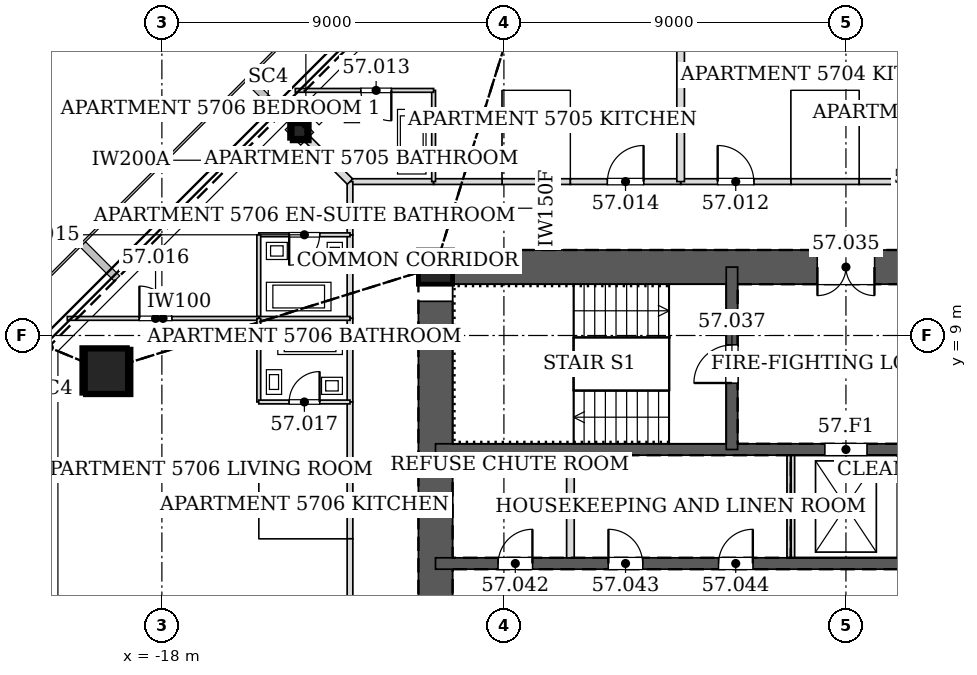
"""IFC4 building model, lengths in metres.
Left out: names, types, materials, properties, quantities, classifications, styles, units other than length and angle.
Written with IfcOpenShell. Run it as: python <this file> out.ifc"""

import sys

from ifc_helpers import new_model, si_unit, direction, frame, frame_2d, origin, origin_2d, place, context, subcontext, project, spatial, rectangle, hollow_rectangle, extrude, element, fill, save


model = new_model("IFC4")
c1 = context("Model", 3, precision=1e-05, world=origin(), true_north=direction((0.0, 1.0)))
c2 = subcontext(c1, "Body", "Model", "MODEL_VIEW")
j1 = project(units=[si_unit("LENGTHUNIT", "METRE"), si_unit("PLANEANGLEUNIT", "RADIAN")], contexts=[c1])
p1 = place(None, origin())
s1 = spatial("IfcSite", under=j1, at=p1, CompositionType="ELEMENT")
p2 = place(p1, origin())
s2 = spatial("IfcBuilding", under=s1, at=p2, CompositionType="ELEMENT")
p3 = place(p2, frame((0.0, 0.0, 241.4)))
s3 = spatial("IfcBuildingStorey", under=s2, at=p3, CompositionType="ELEMENT", Elevation=241.4)
p4 = place(p3, frame((-19.508, 8.08, 0.0), z_axis=(0.028277121884, -0.011698403216, 0.999531666202), x_axis=(0.382282742426, 0.924045401938, 0.0)))
e1 = element("IfcColumn", 1, at=p4, inside=s3, PredefinedType="COLUMN", context=c2, shape_type="SweptSolid", body=[
    extrude(hollow_rectangle(XDim=1.2, YDim=1.2, WallThickness=0.055, at=origin_2d()), origin(), (0.0, 0.0, 1.0), 3.402),
])
p5 = place(p3, frame((-14.415, 14.415, 0.0), z_axis=(0.020024994503, -0.020024994503, 0.999598919162), x_axis=(0.707106781187, 0.707106781187, 0.0)))
e2 = element("IfcColumn", 2, at=p5, inside=s3, PredefinedType="COLUMN", context=c2, shape_type="SweptSolid", body=[
    extrude(hollow_rectangle(XDim=0.45, YDim=0.45, WallThickness=0.02, at=origin_2d()), origin(), (0.0, 0.0, 1.0), 3.402),
])
p6 = place(p3, frame((-10.8, 10.8, 0.0), z_axis=(0.0, 0.0, 1.0), x_axis=(1.0, 0.0, 0.0)))
e3 = element("IfcColumn", 3, at=p6, inside=s3, PredefinedType="COLUMN", context=c2, shape_type="SweptSolid", body=[
    extrude(hollow_rectangle(XDim=0.9, YDim=0.9, WallThickness=0.04, at=origin_2d()), origin(), (0.0, 0.0, 1.0), 3.4),
])
p7 = place(p3, frame((10.8, 10.8, 0.0), z_axis=(0.0, 0.0, 1.0), x_axis=(-1.0, 0.0, 0.0)))
e4 = element("IfcWall", 4, at=p7, inside=s3, PredefinedType="SOLIDWALL", context=c2, shape_type="SweptSolid", body=[
    extrude(rectangle(XDim=21.6, YDim=0.9, at=frame_2d((10.8, 0.0))), origin(), (0.0, 0.0, 1.0), 3.4),
])
p8 = place(p7, frame((10.05, 0.0, 0.0)))
e5 = element("IfcOpeningElement", 5, at=p8, cuts=e4, PredefinedType="OPENING", context=c2, shape_type="SweptSolid", body=[
    extrude(rectangle(XDim=1.5, YDim=2.1, at=frame_2d((0.75, 1.05))), frame((0.0, 0.46, 0.0), z_axis=(0.0, -1.0, 0.0), x_axis=(1.0, 0.0, 0.0)), (0.0, 0.0, 1.0), 0.92),
])
p9 = place(p3, frame((-10.8, 10.8, 0.0), z_axis=(0.0, 0.0, 1.0), x_axis=(0.0, -1.0, 0.0)))
e6 = element("IfcWall", 6, at=p9, inside=s3, PredefinedType="SOLIDWALL", context=c2, shape_type="SweptSolid", body=[
    extrude(rectangle(XDim=21.6, YDim=0.9, at=frame_2d((10.8, 0.0))), origin(), (0.0, 0.0, 1.0), 3.4),
])
p10 = place(p9, frame((8.7, 0.0, 0.0)))
e7 = element("IfcOpeningElement", 7, at=p10, cuts=e6, PredefinedType="OPENING", context=c2, shape_type="SweptSolid", body=[
    extrude(rectangle(XDim=1.2, YDim=2.1, at=frame_2d((0.6, 1.05))), frame((0.0, 0.46, 0.0), z_axis=(0.0, -1.0, 0.0), x_axis=(1.0, 0.0, 0.0)), (0.0, 0.0, 1.0), 0.92),
])
p11 = place(p9, frame((11.7, 0.0, 0.0)))
e8 = element("IfcOpeningElement", 8, at=p11, cuts=e6, PredefinedType="OPENING", context=c2, shape_type="SweptSolid", body=[
    extrude(rectangle(XDim=1.2, YDim=2.1, at=frame_2d((0.6, 1.05))), frame((0.0, 0.46, 0.0), z_axis=(0.0, -1.0, 0.0), x_axis=(1.0, 0.0, 0.0)), (0.0, 0.0, 1.0), 0.92),
])
p12 = place(p3, frame((-10.8, 3.0, 0.0), z_axis=(0.0, 0.0, 1.0), x_axis=(1.0, 0.0, 0.0)))
e9 = element("IfcWall", 9, at=p12, inside=s3, PredefinedType="SOLIDWALL", context=c2, shape_type="SweptSolid", body=[
    extrude(rectangle(XDim=21.6, YDim=0.3, at=frame_2d((10.8, 0.0))), origin(), (0.0, 0.0, 1.0), 3.4),
])
p13 = place(p12, frame((1.65, 0.0, 0.0)))
e10 = element("IfcOpeningElement", 10, at=p13, cuts=e9, PredefinedType="OPENING", context=c2, shape_type="SweptSolid", body=[
    extrude(rectangle(XDim=0.9, YDim=2.1, at=frame_2d((0.45, 1.05))), frame((0.0, 0.16, 0.0), z_axis=(0.0, -1.0, 0.0), x_axis=(1.0, 0.0, 0.0)), (0.0, 0.0, 1.0), 0.32),
])
p14 = place(p12, frame((4.55, 0.0, 0.0)))
e11 = element("IfcOpeningElement", 11, at=p14, cuts=e9, PredefinedType="OPENING", context=c2, shape_type="SweptSolid", body=[
    extrude(rectangle(XDim=0.9, YDim=2.1, at=frame_2d((0.45, 1.05))), frame((0.0, 0.16, 0.0), z_axis=(0.0, -1.0, 0.0), x_axis=(1.0, 0.0, 0.0)), (0.0, 0.0, 1.0), 0.32),
])
p15 = place(p12, frame((7.45, 0.0, 0.0)))
e12 = element("IfcOpeningElement", 12, at=p15, cuts=e9, PredefinedType="OPENING", context=c2, shape_type="SweptSolid", body=[
    extrude(rectangle(XDim=0.9, YDim=2.1, at=frame_2d((0.45, 1.05))), frame((0.0, 0.16, 0.0), z_axis=(0.0, -1.0, 0.0), x_axis=(1.0, 0.0, 0.0)), (0.0, 0.0, 1.0), 0.32),
])
p16 = place(p12, frame((13.25, 0.0, 0.0)))
e13 = element("IfcOpeningElement", 13, at=p16, cuts=e9, PredefinedType="OPENING", context=c2, shape_type="SweptSolid", body=[
    extrude(rectangle(XDim=0.9, YDim=2.1, at=frame_2d((0.45, 1.05))), frame((0.0, 0.16, 0.0), z_axis=(0.0, -1.0, 0.0), x_axis=(1.0, 0.0, 0.0)), (0.0, 0.0, 1.0), 0.32),
])
p17 = place(p12, frame((16.15, 0.0, 0.0)))
e14 = element("IfcOpeningElement", 14, at=p17, cuts=e9, PredefinedType="OPENING", context=c2, shape_type="SweptSolid", body=[
    extrude(rectangle(XDim=0.9, YDim=2.1, at=frame_2d((0.45, 1.05))), frame((0.0, 0.16, 0.0), z_axis=(0.0, -1.0, 0.0), x_axis=(1.0, 0.0, 0.0)), (0.0, 0.0, 1.0), 0.32),
])
p18 = place(p12, frame((19.05, 0.0, 0.0)))
e15 = element("IfcOpeningElement", 15, at=p18, cuts=e9, PredefinedType="OPENING", context=c2, shape_type="SweptSolid", body=[
    extrude(rectangle(XDim=0.9, YDim=2.1, at=frame_2d((0.45, 1.05))), frame((0.0, 0.16, 0.0), z_axis=(0.0, -1.0, 0.0), x_axis=(1.0, 0.0, 0.0)), (0.0, 0.0, 1.0), 0.32),
])
p19 = place(p3, frame((-10.8, 6.0, 0.0), z_axis=(0.0, 0.0, 1.0), x_axis=(1.0, 0.0, 0.0)))
e16 = element("IfcWall", 16, at=p19, inside=s3, PredefinedType="SOLIDWALL", context=c2, shape_type="SweptSolid", body=[
    extrude(rectangle(XDim=21.6, YDim=0.3, at=frame_2d((10.8, 0.0))), origin(), (0.0, 0.0, 1.0), 3.4),
])
p20 = place(p19, frame((10.25, 0.0, 0.0)))
e17 = element("IfcOpeningElement", 17, at=p20, cuts=e16, PredefinedType="OPENING", context=c2, shape_type="SweptSolid", body=[
    extrude(rectangle(XDim=1.1, YDim=2.1, at=frame_2d((0.55, 1.05))), frame((0.0, 0.16, 0.0), z_axis=(0.0, -1.0, 0.0), x_axis=(1.0, 0.0, 0.0)), (0.0, 0.0, 1.0), 0.32),
])
p21 = place(p3, frame((-3.0, 6.0, 0.0), z_axis=(0.0, 0.0, 1.0), x_axis=(0.0, 1.0, 0.0)))
e18 = element("IfcWall", 18, at=p21, inside=s3, PredefinedType="SOLIDWALL", context=c2, shape_type="SweptSolid", body=[
    extrude(rectangle(XDim=4.8, YDim=0.3, at=frame_2d((2.4, 0.0))), origin(), (0.0, 0.0, 1.0), 3.4),
])
p22 = place(p21, frame((1.75, 0.0, 0.0)))
e19 = element("IfcOpeningElement", 19, at=p22, cuts=e18, PredefinedType="OPENING", context=c2, shape_type="SweptSolid", body=[
    extrude(rectangle(XDim=1.0, YDim=2.1, at=frame_2d((0.5, 1.05))), frame((0.0, 0.16, 0.0), z_axis=(0.0, -1.0, 0.0), x_axis=(1.0, 0.0, 0.0)), (0.0, 0.0, 1.0), 0.32),
])
p23 = place(p3, frame((0.351, 13.05, 0.0), z_axis=(0.0, 0.0, 1.0), x_axis=(-1.0, 0.0, 0.0)))
e20 = element("IfcWall", 20, at=p23, inside=s3, PredefinedType="PARTITIONING", context=c2, shape_type="SweptSolid", body=[
    extrude(rectangle(XDim=1.802, YDim=0.15, at=frame_2d((0.901, 0.0))), origin(), (0.0, 0.0, 1.0), 2.332),
])
p24 = place(p3, frame((-1.449, 13.05, 0.0), z_axis=(0.0, 0.0, 1.0), x_axis=(-1.0, 0.0, 0.0)))
e21 = element("IfcWall", 21, at=p24, inside=s3, PredefinedType="PARTITIONING", context=c2, shape_type="SweptSolid", body=[
    extrude(rectangle(XDim=2.902, YDim=0.15, at=frame_2d((1.451, 0.0))), origin(), (0.0, 0.0, 1.0), 2.662),
])
p25 = place(p24, frame((0.976, 0.0, 0.0)))
e22 = element("IfcOpeningElement", 22, at=p25, cuts=e21, PredefinedType="OPENING", context=c2, shape_type="SweptSolid", body=[
    extrude(rectangle(XDim=0.95, YDim=2.1, at=frame_2d((0.475, 1.05))), frame((0.0, 0.085, 0.0), z_axis=(0.0, -1.0, 0.0), x_axis=(1.0, 0.0, 0.0)), (0.0, 0.0, 1.0), 0.17),
])
p26 = place(p3, frame((2.151, 13.05, 0.0), z_axis=(0.0, 0.0, 1.0), x_axis=(-1.0, 0.0, 0.0)))
e23 = element("IfcWall", 23, at=p26, inside=s3, PredefinedType="PARTITIONING", context=c2, shape_type="SweptSolid", body=[
    extrude(rectangle(XDim=1.802, YDim=0.15, at=frame_2d((0.901, 0.0))), origin(), (0.0, 0.0, 1.0), 2.662),
])
p27 = place(p3, frame((-10.849, 13.05, 0.0), z_axis=(0.0, 0.0, 1.0), x_axis=(-1.0, 0.0, 0.0)))
e24 = element("IfcWall", 24, at=p27, inside=s3, PredefinedType="PARTITIONING", context=c2, shape_type="SweptSolid", body=[
    extrude(rectangle(XDim=2.201, YDim=0.15, at=frame_2d((1.101, 0.0))), origin(), (0.0, 0.0, 1.0), 2.588),
])
p28 = place(p3, frame((-7.249, 13.05, 0.0), z_axis=(0.0, 0.0, 1.0), x_axis=(-1.0, 0.0, 0.0)))
e25 = element("IfcWall", 25, at=p28, inside=s3, PredefinedType="PARTITIONING", context=c2, shape_type="SweptSolid", body=[
    extrude(rectangle(XDim=1.802, YDim=0.15, at=frame_2d((0.901, 0.0))), origin(), (0.0, 0.0, 1.0), 2.662),
])
p29 = place(p3, frame((-9.049, 13.05, 0.0), z_axis=(0.0, 0.0, 1.0), x_axis=(-1.0, 0.0, 0.0)))
e26 = element("IfcWall", 26, at=p29, inside=s3, PredefinedType="PARTITIONING", context=c2, shape_type="SweptSolid", body=[
    extrude(rectangle(XDim=1.802, YDim=0.15, at=frame_2d((0.901, 0.0))), origin(), (0.0, 0.0, 1.0), 2.349),
])
p30 = place(p3, frame((-4.349, 13.05, 0.0), z_axis=(0.0, 0.0, 1.0), x_axis=(-1.0, 0.0, 0.0)))
e27 = element("IfcWall", 27, at=p30, inside=s3, PredefinedType="PARTITIONING", context=c2, shape_type="SweptSolid", body=[
    extrude(rectangle(XDim=2.902, YDim=0.15, at=frame_2d((1.451, 0.0))), origin(), (0.0, 0.0, 1.0), 2.662),
])
p31 = place(p30, frame((0.976, 0.0, 0.0)))
e28 = element("IfcOpeningElement", 28, at=p31, cuts=e27, PredefinedType="OPENING", context=c2, shape_type="SweptSolid", body=[
    extrude(rectangle(XDim=0.95, YDim=2.1, at=frame_2d((0.475, 1.05))), frame((0.0, 0.085, 0.0), z_axis=(0.0, -1.0, 0.0), x_axis=(1.0, 0.0, 0.0)), (0.0, 0.0, 1.0), 0.17),
])
p32 = place(p3, frame((-13.05, 11.651, 0.0), z_axis=(0.0, 0.0, 1.0), x_axis=(0.0, -1.0, 0.0)))
e29 = element("IfcWall", 29, at=p32, inside=s3, PredefinedType="PARTITIONING", context=c2, shape_type="SweptSolid", body=[
    extrude(rectangle(XDim=2.202, YDim=0.15, at=frame_2d((1.101, 0.0))), origin(), (0.0, 0.0, 1.0), 2.349),
])
p33 = place(p3, frame((-13.05, 13.05, 0.0), z_axis=(0.0, 0.0, 1.0), x_axis=(0.0, -1.0, 0.0)))
e30 = element("IfcWall", 30, at=p33, inside=s3, PredefinedType="PARTITIONING", context=c2, shape_type="SweptSolid", body=[
    extrude(rectangle(XDim=1.401, YDim=0.15, at=frame_2d((0.701, 0.0))), origin(), (0.0, 0.0, 1.0), 2.588),
])
p34 = place(p3, frame((-13.05, 9.451, 0.0), z_axis=(0.0, 0.0, 1.0), x_axis=(0.0, -1.0, 0.0)))
e31 = element("IfcWall", 31, at=p34, inside=s3, PredefinedType="PARTITIONING", context=c2, shape_type="SweptSolid", body=[
    extrude(rectangle(XDim=2.202, YDim=0.15, at=frame_2d((1.101, 0.0))), origin(), (0.0, 0.0, 1.0), 2.662),
])
p35 = place(p3, frame((-13.05, 5.451, 0.0), z_axis=(0.0, 0.0, 1.0), x_axis=(0.0, -1.0, 0.0)))
e32 = element("IfcWall", 32, at=p35, inside=s3, PredefinedType="PARTITIONING", context=c2, shape_type="SweptSolid", body=[
    extrude(rectangle(XDim=1.802, YDim=0.15, at=frame_2d((0.901, 0.0))), origin(), (0.0, 0.0, 1.0), 2.662),
])
p36 = place(p3, frame((-13.05, 3.651, 0.0), z_axis=(0.0, 0.0, 1.0), x_axis=(0.0, -1.0, 0.0)))
e33 = element("IfcWall", 33, at=p36, inside=s3, PredefinedType="PARTITIONING", context=c2, shape_type="SweptSolid", body=[
    extrude(rectangle(XDim=4.402, YDim=0.15, at=frame_2d((2.201, 0.0))), origin(), (0.0, 0.0, 1.0), 2.332),
])
p37 = place(p36, frame((1.726, 0.0, 0.0)))
e34 = element("IfcOpeningElement", 34, at=p37, cuts=e33, PredefinedType="OPENING", context=c2, shape_type="SweptSolid", body=[
    extrude(rectangle(XDim=0.95, YDim=2.1, at=frame_2d((0.475, 1.05))), frame((0.0, 0.085, 0.0), z_axis=(0.0, -1.0, 0.0), x_axis=(1.0, 0.0, 0.0)), (0.0, 0.0, 1.0), 0.17),
])
p38 = place(p3, frame((-13.05, 7.251, 0.0), z_axis=(0.0, 0.0, 1.0), x_axis=(0.0, -1.0, 0.0)))
e35 = element("IfcWall", 35, at=p38, inside=s3, PredefinedType="PARTITIONING", context=c2, shape_type="SweptSolid", body=[
    extrude(rectangle(XDim=1.802, YDim=0.15, at=frame_2d((0.901, 0.0))), origin(), (0.0, 0.0, 1.0), 2.662),
])
p39 = place(p3, frame((-4.35, 21.091, 0.0), z_axis=(0.0, 0.0, 1.0), x_axis=(0.0, -1.0, 0.0)))
e36 = element("IfcWall", 36, at=p39, inside=s3, PredefinedType="PARTITIONING", context=c2, shape_type="SweptSolid", body=[
    extrude(rectangle(XDim=8.041, YDim=0.2, at=frame_2d((4.021, 0.0))), origin(), (0.0, 0.0, 1.0), 2.662),
])
p40 = place(p3, frame((-10.85, 13.05, 0.0), z_axis=(0.0, 0.0, 1.0), x_axis=(0.0, 1.0, 0.0)))
e37 = element("IfcWall", 37, at=p40, inside=s3, PredefinedType="PARTITIONING", context=c2, shape_type="SweptSolid", body=[
    extrude(rectangle(XDim=2.4, YDim=0.1, at=frame_2d((1.2, 0.0))), origin(), (0.0, 0.0, 1.0), 2.786),
])
p41 = place(p3, frame((-10.85, 15.45, 0.0), z_axis=(0.0, 0.0, 1.0), x_axis=(-1.0, 0.0, 0.0)))
e38 = element("IfcWall", 38, at=p41, inside=s3, PredefinedType="PARTITIONING", context=c2, shape_type="SweptSolid", body=[
    extrude(rectangle(XDim=3.639, YDim=0.1, at=frame_2d((1.82, 0.0))), origin(), (0.0, 0.0, 1.0), 2.784),
])
p42 = place(p41, frame((1.113, 0.0, 0.0)))
e39 = element("IfcOpeningElement", 39, at=p42, cuts=e38, PredefinedType="OPENING", context=c2, shape_type="SweptSolid", body=[
    extrude(rectangle(XDim=0.8, YDim=2.1, at=frame_2d((0.4, 1.05))), frame((0.0, 0.06, 0.0), z_axis=(0.0, -1.0, 0.0), x_axis=(1.0, 0.0, 0.0)), (0.0, 0.0, 1.0), 0.12),
])
p43 = place(p3, frame((-14.174, 14.174, 0.0), z_axis=(0.0, 0.0, 1.0), x_axis=(0.707106781187, -0.707106781187, 0.0)))
e40 = element("IfcWall", 40, at=p43, inside=s3, PredefinedType="PARTITIONING", context=c2, shape_type="SweptSolid", body=[
    extrude(rectangle(XDim=1.59, YDim=0.2, at=frame_2d((0.795, 0.0))), origin(), (0.0, 0.0, 1.0), 2.588),
])
p44 = place(p3, frame((-13.05, 11.65, 0.0), z_axis=(0.0, 0.0, 1.0), x_axis=(-1.0, 0.0, 0.0)))
e41 = element("IfcWall", 41, at=p44, inside=s3, PredefinedType="PARTITIONING", context=c2, shape_type="SweptSolid", body=[
    extrude(rectangle(XDim=2.4, YDim=0.1, at=frame_2d((1.2, 0.0))), origin(), (0.0, 0.0, 1.0), 2.786),
])
p45 = place(p44, frame((0.8, 0.0, 0.0)))
e42 = element("IfcOpeningElement", 42, at=p45, cuts=e41, PredefinedType="OPENING", context=c2, shape_type="SweptSolid", body=[
    extrude(rectangle(XDim=0.8, YDim=2.1, at=frame_2d((0.4, 1.05))), frame((0.0, 0.06, 0.0), z_axis=(0.0, -1.0, 0.0), x_axis=(1.0, 0.0, 0.0)), (0.0, 0.0, 1.0), 0.12),
])
p46 = place(p3, frame((-15.45, 11.65, 0.0), z_axis=(0.0, 0.0, 1.0), x_axis=(0.0, -1.0, 0.0)))
e43 = element("IfcWall", 43, at=p46, inside=s3, PredefinedType="PARTITIONING", context=c2, shape_type="SweptSolid", body=[
    extrude(rectangle(XDim=2.2, YDim=0.1, at=frame_2d((1.1, 0.0))), origin(), (0.0, 0.0, 1.0), 2.349),
])
p47 = place(p3, frame((-15.45, 9.45, 0.0), z_axis=(0.0, 0.0, 1.0), x_axis=(1.0, 0.0, 0.0)))
e44 = element("IfcWall", 44, at=p47, inside=s3, PredefinedType="PARTITIONING", context=c2, shape_type="SweptSolid", body=[
    extrude(rectangle(XDim=2.4, YDim=0.1, at=frame_2d((1.2, 0.0))), origin(), (0.0, 0.0, 1.0), 2.349),
])
p48 = place(p3, frame((-20.49, 9.45, 0.0), z_axis=(0.0, 0.0, 1.0), x_axis=(1.0, 0.0, 0.0)))
e45 = element("IfcWall", 45, at=p48, inside=s3, PredefinedType="PARTITIONING", context=c2, shape_type="SweptSolid", body=[
    extrude(rectangle(XDim=5.04, YDim=0.1, at=frame_2d((2.52, 0.0))), origin(), (0.0, 0.0, 1.0), 2.349),
])
p49 = place(p48, frame((1.898, 0.0, 0.0)))
e46 = element("IfcOpeningElement", 46, at=p49, cuts=e45, PredefinedType="OPENING", context=c2, shape_type="SweptSolid", body=[
    extrude(rectangle(XDim=0.85, YDim=2.1, at=frame_2d((0.425, 1.05))), frame((0.0, 0.06, 0.0), z_axis=(0.0, -1.0, 0.0), x_axis=(1.0, 0.0, 0.0)), (0.0, 0.0, 1.0), 0.12),
])
p50 = place(p3, frame((-15.45, 9.45, 0.0), z_axis=(0.0, 0.0, 1.0), x_axis=(0.0, -1.0, 0.0)))
e47 = element("IfcWall", 47, at=p50, inside=s3, PredefinedType="PARTITIONING", context=c2, shape_type="SweptSolid", body=[
    extrude(rectangle(XDim=2.2, YDim=0.1, at=frame_2d((1.1, 0.0))), origin(), (0.0, 0.0, 1.0), 2.349),
])
p51 = place(p3, frame((-15.45, 7.25, 0.0), z_axis=(0.0, 0.0, 1.0), x_axis=(1.0, 0.0, 0.0)))
e48 = element("IfcWall", 48, at=p51, inside=s3, PredefinedType="PARTITIONING", context=c2, shape_type="SweptSolid", body=[
    extrude(rectangle(XDim=2.4, YDim=0.1, at=frame_2d((1.2, 0.0))), origin(), (0.0, 0.0, 1.0), 2.662),
])
p52 = place(p51, frame((0.8, 0.0, 0.0)))
e49 = element("IfcOpeningElement", 49, at=p52, cuts=e48, PredefinedType="OPENING", context=c2, shape_type="SweptSolid", body=[
    extrude(rectangle(XDim=0.8, YDim=2.1, at=frame_2d((0.4, 1.05))), frame((0.0, 0.06, 0.0), z_axis=(0.0, -1.0, 0.0), x_axis=(1.0, 0.0, 0.0)), (0.0, 0.0, 1.0), 0.12),
])
for number, where, z_axis, x_axis in (
    (50, (-7.25, 3.15, 0.0), (0.0, 0.0, 1.0), (0.0, 1.0, 0.0)),
    (51, (-1.45, 3.15, 0.0), (0.0, 0.0, 1.0), (0.0, 1.0, 0.0)),
    (52, (1.45, 3.15, 0.0), (0.0, 0.0, 1.0), (0.0, 1.0, 0.0)),
):
    element("IfcWall", number, at=place(p3, frame(where, z_axis=z_axis, x_axis=x_axis)), inside=s3, PredefinedType="PARTITIONING", context=c2, shape_type="SweptSolid", body=[
        extrude(rectangle(XDim=2.7, YDim=0.2, at=frame_2d((1.35, 0.0))), origin(), (0.0, 0.0, 1.0), 3.2),
    ])
p53 = place(p25, frame((0.95, 0.0, 0.0), z_axis=(0.0, 0.0, 1.0), x_axis=(-1.0, 0.0, 0.0)))
e53 = element("IfcDoor", 53, at=p53, inside=s3, OperationType="SINGLE_SWING_LEFT", PredefinedType="DOOR", context=c2, shape_type="SweptSolid", body=[
    extrude(rectangle(XDim=0.95, YDim=2.1, at=frame_2d((0.475, 1.05))), frame((0.0, 0.025, 0.0), z_axis=(0.0, -1.0, 0.0), x_axis=(1.0, 0.0, 0.0)), (0.0, 0.0, 1.0), 0.05),
])
fill(e22, e53)
p54 = place(p42, origin())
e54 = element("IfcDoor", 54, at=p54, inside=s3, OperationType="SINGLE_SWING_LEFT", PredefinedType="DOOR", context=c2, shape_type="SweptSolid", body=[
    extrude(rectangle(XDim=0.8, YDim=2.1, at=frame_2d((0.4, 1.05))), frame((0.0, 0.025, 0.0), z_axis=(0.0, -1.0, 0.0), x_axis=(1.0, 0.0, 0.0)), (0.0, 0.0, 1.0), 0.05),
])
fill(e39, e54)
p55 = place(p31, frame((0.95, 0.0, 0.0), z_axis=(0.0, 0.0, 1.0), x_axis=(-1.0, 0.0, 0.0)))
e55 = element("IfcDoor", 55, at=p55, inside=s3, OperationType="SINGLE_SWING_RIGHT", PredefinedType="DOOR", context=c2, shape_type="SweptSolid", body=[
    extrude(rectangle(XDim=0.95, YDim=2.1, at=frame_2d((0.475, 1.05))), frame((0.0, 0.025, 0.0), z_axis=(0.0, -1.0, 0.0), x_axis=(1.0, 0.0, 0.0)), (0.0, 0.0, 1.0), 0.05),
])
fill(e28, e55)
p56 = place(p45, origin())
e56 = element("IfcDoor", 56, at=p56, inside=s3, OperationType="SINGLE_SWING_RIGHT", PredefinedType="DOOR", context=c2, shape_type="SweptSolid", body=[
    extrude(rectangle(XDim=0.8, YDim=2.1, at=frame_2d((0.4, 1.05))), frame((0.0, 0.025, 0.0), z_axis=(0.0, -1.0, 0.0), x_axis=(1.0, 0.0, 0.0)), (0.0, 0.0, 1.0), 0.05),
])
fill(e42, e56)
p57 = place(p49, origin())
e57 = element("IfcDoor", 57, at=p57, inside=s3, OperationType="SINGLE_SWING_LEFT", PredefinedType="DOOR", context=c2, shape_type="SweptSolid", body=[
    extrude(rectangle(XDim=0.85, YDim=2.1, at=frame_2d((0.425, 1.05))), frame((0.0, 0.025, 0.0), z_axis=(0.0, -1.0, 0.0), x_axis=(1.0, 0.0, 0.0)), (0.0, 0.0, 1.0), 0.05),
])
fill(e46, e57)
p58 = place(p52, origin())
e58 = element("IfcDoor", 58, at=p58, inside=s3, OperationType="SINGLE_SWING_RIGHT", PredefinedType="DOOR", context=c2, shape_type="SweptSolid", body=[
    extrude(rectangle(XDim=0.8, YDim=2.1, at=frame_2d((0.4, 1.05))), frame((0.0, 0.025, 0.0), z_axis=(0.0, -1.0, 0.0), x_axis=(1.0, 0.0, 0.0)), (0.0, 0.0, 1.0), 0.05),
])
fill(e49, e58)
p59 = place(p8, origin())
e59 = element("IfcDoor", 59, at=p59, inside=s3, OperationType="DOUBLE_DOOR_SINGLE_SWING", PredefinedType="DOOR", context=c2, shape_type="SweptSolid", body=[
    extrude(rectangle(XDim=1.5, YDim=2.1, at=frame_2d((0.75, 1.05))), frame((0.0, 0.025, 0.0), z_axis=(0.0, -1.0, 0.0), x_axis=(1.0, 0.0, 0.0)), (0.0, 0.0, 1.0), 0.05),
])
fill(e5, e59)
p60 = place(p22, origin())
e60 = element("IfcDoor", 60, at=p60, inside=s3, OperationType="SINGLE_SWING_LEFT", PredefinedType="DOOR", context=c2, shape_type="SweptSolid", body=[
    extrude(rectangle(XDim=1.0, YDim=2.1, at=frame_2d((0.5, 1.05))), frame((0.0, 0.025, 0.0), z_axis=(0.0, -1.0, 0.0), x_axis=(1.0, 0.0, 0.0)), (0.0, 0.0, 1.0), 0.05),
])
fill(e19, e60)
p61 = place(p13, origin())
e61 = element("IfcDoor", 61, at=p61, inside=s3, OperationType="SINGLE_SWING_RIGHT", PredefinedType="DOOR", context=c2, shape_type="SweptSolid", body=[
    extrude(rectangle(XDim=0.9, YDim=2.1, at=frame_2d((0.45, 1.05))), frame((0.0, 0.025, 0.0), z_axis=(0.0, -1.0, 0.0), x_axis=(1.0, 0.0, 0.0)), (0.0, 0.0, 1.0), 0.05),
])
fill(e10, e61)
p62 = place(p14, origin())
e62 = element("IfcDoor", 62, at=p62, inside=s3, OperationType="SINGLE_SWING_LEFT", PredefinedType="DOOR", context=c2, shape_type="SweptSolid", body=[
    extrude(rectangle(XDim=0.9, YDim=2.1, at=frame_2d((0.45, 1.05))), frame((0.0, 0.025, 0.0), z_axis=(0.0, -1.0, 0.0), x_axis=(1.0, 0.0, 0.0)), (0.0, 0.0, 1.0), 0.05),
])
fill(e11, e62)
p63 = place(p15, origin())
e63 = element("IfcDoor", 63, at=p63, inside=s3, OperationType="SINGLE_SWING_RIGHT", PredefinedType="DOOR", context=c2, shape_type="SweptSolid", body=[
    extrude(rectangle(XDim=0.9, YDim=2.1, at=frame_2d((0.45, 1.05))), frame((0.0, 0.025, 0.0), z_axis=(0.0, -1.0, 0.0), x_axis=(1.0, 0.0, 0.0)), (0.0, 0.0, 1.0), 0.05),
])
fill(e12, e63)
p64 = place(p20, origin())
e64 = element("IfcDoor", 64, at=p64, inside=s3, OperationType="DOUBLE_DOOR_SLIDING", PredefinedType="DOOR", context=c2, shape_type="SweptSolid", body=[
    extrude(rectangle(XDim=1.1, YDim=2.1, at=frame_2d((0.55, 1.05))), frame((0.0, 0.025, 0.0), z_axis=(0.0, -1.0, 0.0), x_axis=(1.0, 0.0, 0.0)), (0.0, 0.0, 1.0), 0.05),
])
fill(e17, e64)
save(model, sys.argv[1])
